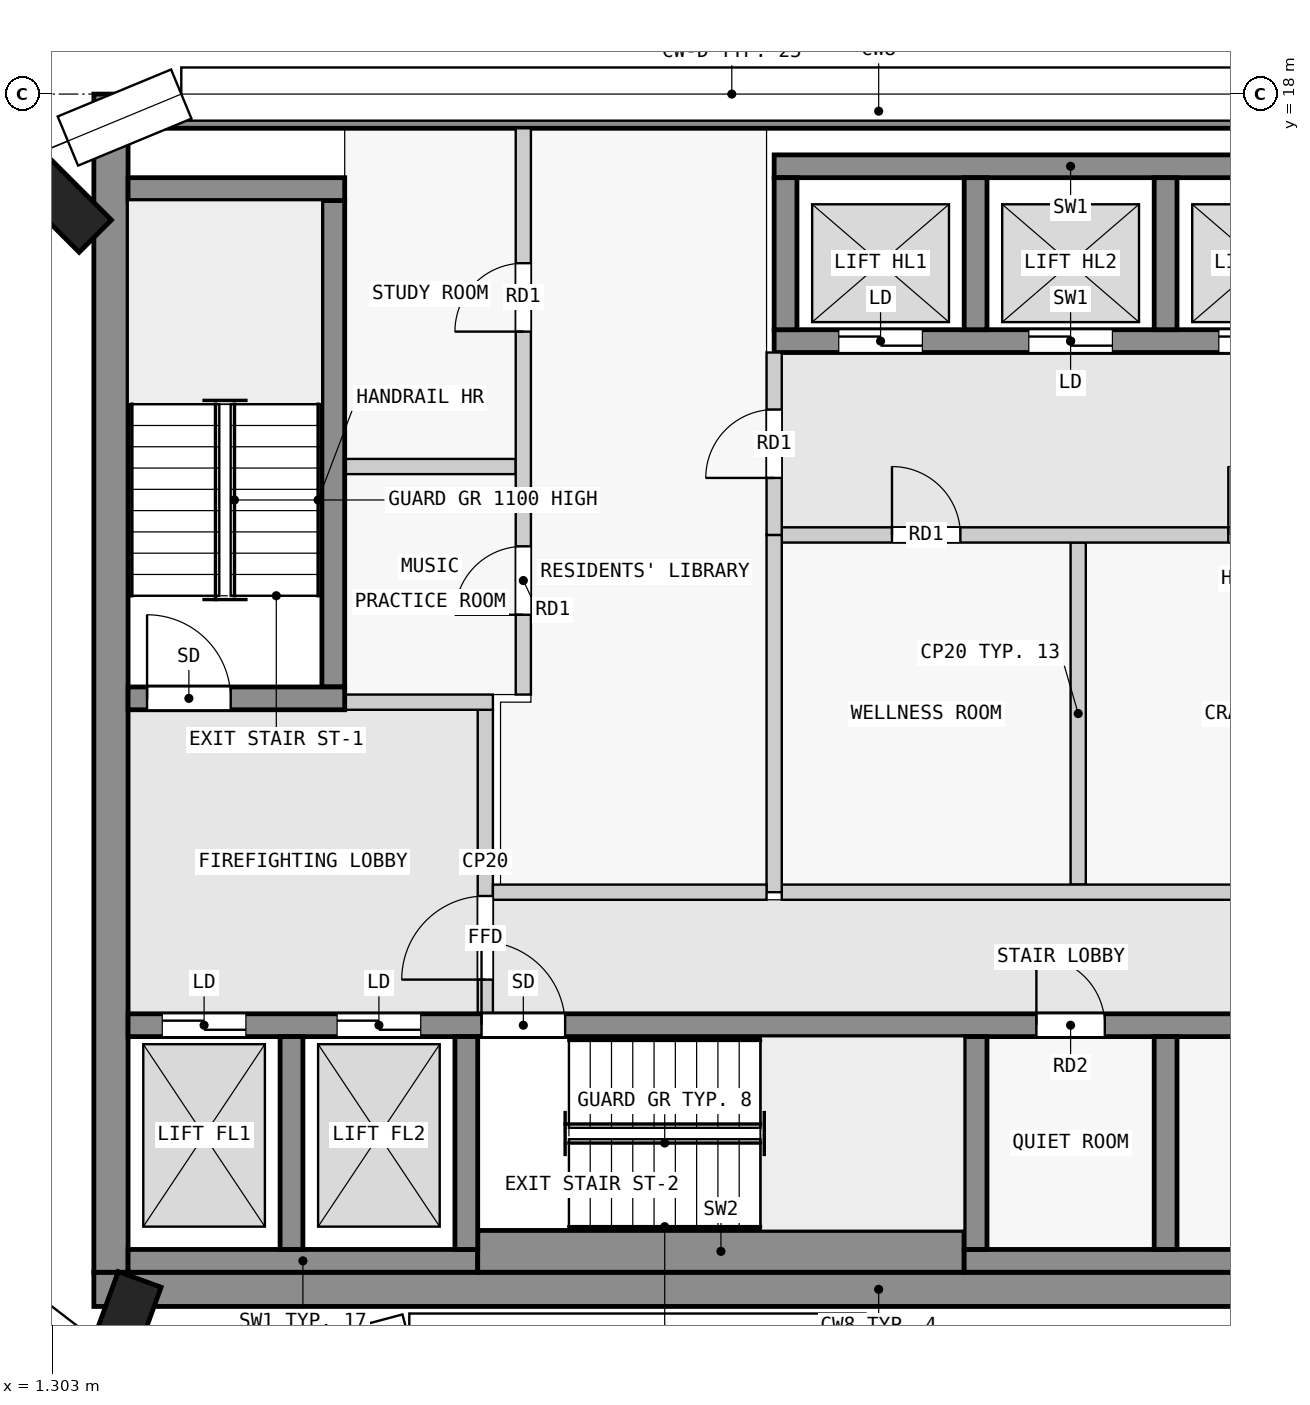
"""IFC4 building model, lengths in metres.
Left out: names, types, materials, properties, quantities, classifications, styles, units other than length and angle.
Written with IfcOpenShell. Run it as: python <this file> out.ifc"""

import sys

from ifc_helpers import new_model, si_unit, direction, frame, frame_2d, origin, origin_2d, place, context, subcontext, project, spatial, rectangle, extrude, element, fill, save


model = new_model("IFC4")
c1 = context("Model", 3, precision=1e-05, world=origin(), true_north=direction((0.0, 1.0)))
c2 = subcontext(c1, "Body", "Model", "MODEL_VIEW")
j1 = project(units=[si_unit("LENGTHUNIT", "METRE"), si_unit("PLANEANGLEUNIT", "RADIAN")], contexts=[c1])
p1 = place(None, origin())
s1 = spatial("IfcSite", under=j1, at=p1, CompositionType="ELEMENT")
p2 = place(p1, origin())
s2 = spatial("IfcBuilding", under=s1, at=p2, CompositionType="ELEMENT")
p3 = place(p2, frame((0.0, 0.0, 291.4)))
s3 = spatial("IfcBuildingStorey", under=s2, at=p3, CompositionType="ELEMENT", Elevation=291.4)
for number, where, z_axis, x_axis in (
    (1, (1.374, 16.626, 0.0), (0.0, 0.0, 1.0), (0.707, 0.707, 0.0)),
    (2, (2.213, 1.748, 0.0), (0.0, 0.0, 1.0), (-0.94, 0.342, 0.0)),
):
    element("IfcColumn", number, at=place(p3, frame(where, z_axis=z_axis, x_axis=x_axis)), inside=s3, PredefinedType="COLUMN", context=c2, shape_type="SweptSolid", body=[
        extrude(rectangle(XDim=0.6, YDim=1.4, at=origin_2d()), origin(), (0.0, 0.0, 1.0), 3.5),
    ])
for number, where, z_axis, x_axis in (
    (3, (1.85, 2.275, 0.0), (0.0, 0.0, 1.0), (1.0, 0.0, 0.0)),
    (4, (1.85, 17.775, 0.0), (0.0, 0.0, 1.0), (1.0, 0.0, 0.0)),
):
    element("IfcWall", number, at=place(p3, frame(where, z_axis=z_axis, x_axis=x_axis)), inside=s3, PredefinedType="SHEAR", context=c2, shape_type="SweptSolid", body=[
        extrude(rectangle(XDim=20.65, YDim=0.45, at=frame_2d((10.325, 0.0))), origin(), (0.0, 0.0, 1.0), 3.05),
    ])
p4 = place(p3, frame((2.075, 2.5, 0.0), z_axis=(0.0, 0.0, 1.0), x_axis=(0.0, 1.0, 0.0)))
e5 = element("IfcWall", 5, at=p4, inside=s3, PredefinedType="SHEAR", context=c2, shape_type="SweptSolid", body=[
    extrude(rectangle(XDim=15.05, YDim=0.45, at=frame_2d((7.525, 0.0))), origin(), (0.0, 0.0, 1.0), 3.05),
])
p5 = place(p3, frame((2.3, 2.65, 0.0), z_axis=(0.0, 0.0, 1.0), x_axis=(1.0, 0.0, 0.0)))
e6 = element("IfcWall", 6, at=p5, inside=s3, PredefinedType="SHEAR", context=c2, shape_type="SweptSolid", body=[
    extrude(rectangle(XDim=4.6, YDim=0.3, at=frame_2d((2.3, 0.0))), origin(), (0.0, 0.0, 1.0), 3.05),
])
p6 = place(p3, frame((6.9, 2.775, 0.0), z_axis=(0.0, 0.0, 1.0), x_axis=(1.0, 0.0, 0.0)))
e7 = element("IfcWall", 7, at=p6, inside=s3, PredefinedType="SHEAR", context=c2, shape_type="SweptSolid", body=[
    extrude(rectangle(XDim=6.4, YDim=0.55, at=frame_2d((3.2, 0.0))), origin(), (0.0, 0.0, 1.0), 3.05),
])
p7 = place(p3, frame((13.3, 2.65, 0.0), z_axis=(0.0, 0.0, 1.0), x_axis=(1.0, 0.0, 0.0)))
e8 = element("IfcWall", 8, at=p7, inside=s3, PredefinedType="SHEAR", context=c2, shape_type="SweptSolid", body=[
    extrude(rectangle(XDim=7.8, YDim=0.3, at=frame_2d((3.9, 0.0))), origin(), (0.0, 0.0, 1.0), 3.05),
])
for number, where, z_axis, x_axis in (
    (9, (4.45, 2.8, 0.0), (0.0, 0.0, 1.0), (0.0, 1.0, 0.0)),
    (10, (6.75, 2.8, 0.0), (0.0, 0.0, 1.0), (0.0, 1.0, 0.0)),
    (11, (13.45, 2.8, 0.0), (0.0, 0.0, 1.0), (0.0, 1.0, 0.0)),
    (12, (15.95, 2.8, 0.0), (0.0, 0.0, 1.0), (0.0, 1.0, 0.0)),
):
    element("IfcWall", number, at=place(p3, frame(where, z_axis=z_axis, x_axis=x_axis)), inside=s3, PredefinedType="SHEAR", context=c2, shape_type="SweptSolid", body=[
        extrude(rectangle(XDim=2.8, YDim=0.3, at=frame_2d((1.4, 0.0))), origin(), (0.0, 0.0, 1.0), 3.05),
    ])
p8 = place(p3, frame((2.3, 5.75, 0.0), z_axis=(0.0, 0.0, 1.0), x_axis=(1.0, 0.0, 0.0)))
e13 = element("IfcWall", 13, at=p8, inside=s3, PredefinedType="SHEAR", context=c2, shape_type="SweptSolid", body=[
    extrude(rectangle(XDim=18.8, YDim=0.3, at=frame_2d((9.4, 0.0))), origin(), (0.0, 0.0, 1.0), 3.05),
])
p9 = place(p8, frame((4.65, 0.0, 0.0)))
e14 = element("IfcOpeningElement", 14, at=p9, cuts=e13, PredefinedType="OPENING", context=c2, shape_type="SweptSolid", body=[
    extrude(rectangle(XDim=1.1, YDim=2.1, at=frame_2d((0.55, 1.05))), frame((0.0, 0.16, 0.0), z_axis=(0.0, -1.0, 0.0), x_axis=(1.0, 0.0, 0.0)), (0.0, 0.0, 1.0), 0.32),
])
p10 = place(p8, frame((0.45, 0.0, 0.0)))
e15 = element("IfcOpeningElement", 15, at=p10, cuts=e13, PredefinedType="OPENING", context=c2, shape_type="SweptSolid", body=[
    extrude(rectangle(XDim=1.1, YDim=2.1, at=frame_2d((0.55, 1.05))), frame((0.0, 0.16, 0.0), z_axis=(0.0, -1.0, 0.0), x_axis=(1.0, 0.0, 0.0)), (0.0, 0.0, 1.0), 0.32),
])
p11 = place(p8, frame((2.75, 0.0, 0.0)))
e16 = element("IfcOpeningElement", 16, at=p11, cuts=e13, PredefinedType="OPENING", context=c2, shape_type="SweptSolid", body=[
    extrude(rectangle(XDim=1.1, YDim=2.1, at=frame_2d((0.55, 1.05))), frame((0.0, 0.16, 0.0), z_axis=(0.0, -1.0, 0.0), x_axis=(1.0, 0.0, 0.0)), (0.0, 0.0, 1.0), 0.32),
])
p12 = place(p8, frame((11.95, 0.0, 0.0)))
e17 = element("IfcOpeningElement", 17, at=p12, cuts=e13, PredefinedType="OPENING", context=c2, shape_type="SweptSolid", body=[
    extrude(rectangle(XDim=0.9, YDim=2.1, at=frame_2d((0.45, 1.05))), frame((0.0, 0.16, 0.0), z_axis=(0.0, -1.0, 0.0), x_axis=(1.0, 0.0, 0.0)), (0.0, 0.0, 1.0), 0.32),
])
p13 = place(p8, frame((15.7, 0.0, 0.0)))
e18 = element("IfcOpeningElement", 18, at=p13, cuts=e13, PredefinedType="OPENING", context=c2, shape_type="SweptSolid", body=[
    extrude(rectangle(XDim=0.9, YDim=2.1, at=frame_2d((0.45, 1.05))), frame((0.0, 0.16, 0.0), z_axis=(0.0, -1.0, 0.0), x_axis=(1.0, 0.0, 0.0)), (0.0, 0.0, 1.0), 0.32),
])
p14 = place(p3, frame((2.3, 10.05, 0.0), z_axis=(0.0, 0.0, 1.0), x_axis=(1.0, 0.0, 0.0)))
e19 = element("IfcWall", 19, at=p14, inside=s3, PredefinedType="SHEAR", context=c2, shape_type="SweptSolid", body=[
    extrude(rectangle(XDim=2.85, YDim=0.3, at=frame_2d((1.425, 0.0))), origin(), (0.0, 0.0, 1.0), 3.05),
])
p15 = place(p14, frame((0.25, 0.0, 0.0)))
e20 = element("IfcOpeningElement", 20, at=p15, cuts=e19, PredefinedType="OPENING", context=c2, shape_type="SweptSolid", body=[
    extrude(rectangle(XDim=1.1, YDim=2.1, at=frame_2d((0.55, 1.05))), frame((0.0, 0.16, 0.0), z_axis=(0.0, -1.0, 0.0), x_axis=(1.0, 0.0, 0.0)), (0.0, 0.0, 1.0), 0.32),
])
p16 = place(p3, frame((5.0, 10.2, 0.0), z_axis=(0.0, 0.0, 1.0), x_axis=(0.0, 1.0, 0.0)))
e21 = element("IfcWall", 21, at=p16, inside=s3, PredefinedType="SHEAR", context=c2, shape_type="SweptSolid", body=[
    extrude(rectangle(XDim=6.4, YDim=0.3, at=frame_2d((3.2, 0.0))), origin(), (0.0, 0.0, 1.0), 3.05),
])
p17 = place(p3, frame((2.3, 16.75, 0.0), z_axis=(0.0, 0.0, 1.0), x_axis=(1.0, 0.0, 0.0)))
e22 = element("IfcWall", 22, at=p17, inside=s3, PredefinedType="SHEAR", context=c2, shape_type="SweptSolid", body=[
    extrude(rectangle(XDim=2.85, YDim=0.3, at=frame_2d((1.425, 0.0))), origin(), (0.0, 0.0, 1.0), 3.05),
])
p18 = place(p3, frame((10.8, 17.05, 0.0), z_axis=(0.0, 0.0, 1.0), x_axis=(1.0, 0.0, 0.0)))
e23 = element("IfcWall", 23, at=p18, inside=s3, PredefinedType="SHEAR", context=c2, shape_type="SweptSolid", body=[
    extrude(rectangle(XDim=7.8, YDim=0.3, at=frame_2d((3.9, 0.0))), origin(), (0.0, 0.0, 1.0), 3.05),
])
p19 = place(p3, frame((10.8, 14.75, 0.0), z_axis=(0.0, 0.0, 1.0), x_axis=(1.0, 0.0, 0.0)))
e24 = element("IfcWall", 24, at=p19, inside=s3, PredefinedType="SHEAR", context=c2, shape_type="SweptSolid", body=[
    extrude(rectangle(XDim=7.8, YDim=0.3, at=frame_2d((3.9, 0.0))), origin(), (0.0, 0.0, 1.0), 3.05),
])
p20 = place(p19, frame((0.85, 0.0, 0.0)))
e25 = element("IfcOpeningElement", 25, at=p20, cuts=e24, PredefinedType="OPENING", context=c2, shape_type="SweptSolid", body=[
    extrude(rectangle(XDim=1.1, YDim=2.1, at=frame_2d((0.55, 1.05))), frame((0.0, 0.16, 0.0), z_axis=(0.0, -1.0, 0.0), x_axis=(1.0, 0.0, 0.0)), (0.0, 0.0, 1.0), 0.32),
])
p21 = place(p19, frame((3.35, 0.0, 0.0)))
e26 = element("IfcOpeningElement", 26, at=p21, cuts=e24, PredefinedType="OPENING", context=c2, shape_type="SweptSolid", body=[
    extrude(rectangle(XDim=1.1, YDim=2.1, at=frame_2d((0.55, 1.05))), frame((0.0, 0.16, 0.0), z_axis=(0.0, -1.0, 0.0), x_axis=(1.0, 0.0, 0.0)), (0.0, 0.0, 1.0), 0.32),
])
p22 = place(p19, frame((5.85, 0.0, 0.0)))
e27 = element("IfcOpeningElement", 27, at=p22, cuts=e24, PredefinedType="OPENING", context=c2, shape_type="SweptSolid", body=[
    extrude(rectangle(XDim=1.1, YDim=2.1, at=frame_2d((0.55, 1.05))), frame((0.0, 0.16, 0.0), z_axis=(0.0, -1.0, 0.0), x_axis=(1.0, 0.0, 0.0)), (0.0, 0.0, 1.0), 0.32),
])
for number, where, z_axis, x_axis in (
    (28, (10.95, 14.9, 0.0), (0.0, 0.0, 1.0), (0.0, 1.0, 0.0)),
    (29, (13.45, 14.9, 0.0), (0.0, 0.0, 1.0), (0.0, 1.0, 0.0)),
    (30, (15.95, 14.9, 0.0), (0.0, 0.0, 1.0), (0.0, 1.0, 0.0)),
):
    element("IfcWall", number, at=place(p3, frame(where, z_axis=z_axis, x_axis=x_axis)), inside=s3, PredefinedType="SHEAR", context=c2, shape_type="SweptSolid", body=[
        extrude(rectangle(XDim=2.0, YDim=0.3, at=frame_2d((1.0, 0.0))), origin(), (0.0, 0.0, 1.0), 3.05),
    ])
p23 = place(p3, frame((7.0, 5.9, 0.0), z_axis=(0.0, 0.0, 1.0), x_axis=(0.0, 1.0, 0.0)))
e31 = element("IfcWall", 31, at=p23, inside=s3, PredefinedType="PARTITIONING", context=c2, shape_type="SweptSolid", body=[
    extrude(rectangle(XDim=4.0, YDim=0.2, at=frame_2d((2.0, 0.0))), origin(), (0.0, 0.0, 1.0), 3.05),
])
p24 = place(p23, frame((0.45, 0.0, 0.0)))
e32 = element("IfcOpeningElement", 32, at=p24, cuts=e31, PredefinedType="OPENING", context=c2, shape_type="SweptSolid", body=[
    extrude(rectangle(XDim=1.1, YDim=2.1, at=frame_2d((0.55, 1.05))), frame((0.0, 0.11, 0.0), z_axis=(0.0, -1.0, 0.0), x_axis=(1.0, 0.0, 0.0)), (0.0, 0.0, 1.0), 0.22),
])
p25 = place(p3, frame((5.15, 10.0, 0.0), z_axis=(0.0, 0.0, 1.0), x_axis=(1.0, 0.0, 0.0)))
e33 = element("IfcWall", 33, at=p25, inside=s3, PredefinedType="PARTITIONING", context=c2, shape_type="SweptSolid", body=[
    extrude(rectangle(XDim=1.95, YDim=0.2, at=frame_2d((0.975, 0.0))), origin(), (0.0, 0.0, 1.0), 3.05),
])
p26 = place(p3, frame((7.1, 7.5, 0.0), z_axis=(0.0, 0.0, 1.0), x_axis=(1.0, 0.0, 0.0)))
e34 = element("IfcWall", 34, at=p26, inside=s3, PredefinedType="PARTITIONING", context=c2, shape_type="SweptSolid", body=[
    extrude(rectangle(XDim=3.6, YDim=0.2, at=frame_2d((1.8, 0.0))), origin(), (0.0, 0.0, 1.0), 3.05),
])
p27 = place(p3, frame((10.8, 12.2, 0.0), z_axis=(0.0, 0.0, 1.0), x_axis=(0.0, 1.0, 0.0)))
e35 = element("IfcWall", 35, at=p27, inside=s3, PredefinedType="PARTITIONING", context=c2, shape_type="SweptSolid", body=[
    extrude(rectangle(XDim=2.4, YDim=0.2, at=frame_2d((1.2, 0.0))), origin(), (0.0, 0.0, 1.0), 3.05),
])
p28 = place(p27, frame((0.75, 0.0, 0.0)))
e36 = element("IfcOpeningElement", 36, at=p28, cuts=e35, PredefinedType="OPENING", context=c2, shape_type="SweptSolid", body=[
    extrude(rectangle(XDim=0.9, YDim=2.1, at=frame_2d((0.45, 1.05))), frame((0.0, 0.11, 0.0), z_axis=(0.0, -1.0, 0.0), x_axis=(1.0, 0.0, 0.0)), (0.0, 0.0, 1.0), 0.22),
])
p29 = place(p3, frame((10.8, 7.5, 0.0), z_axis=(0.0, 0.0, 1.0), x_axis=(0.0, 1.0, 0.0)))
e37 = element("IfcWall", 37, at=p29, inside=s3, PredefinedType="PARTITIONING", context=c2, shape_type="SweptSolid", body=[
    extrude(rectangle(XDim=4.7, YDim=0.2, at=frame_2d((2.35, 0.0))), origin(), (0.0, 0.0, 1.0), 3.05),
])
p30 = place(p3, frame((10.9, 7.5, 0.0), z_axis=(0.0, 0.0, 1.0), x_axis=(1.0, 0.0, 0.0)))
e38 = element("IfcWall", 38, at=p30, inside=s3, PredefinedType="PARTITIONING", context=c2, shape_type="SweptSolid", body=[
    extrude(rectangle(XDim=8.65, YDim=0.2, at=frame_2d((4.325, 0.0))), origin(), (0.0, 0.0, 1.0), 3.05),
])
p31 = place(p3, frame((10.9, 12.2, 0.0), z_axis=(0.0, 0.0, 1.0), x_axis=(1.0, 0.0, 0.0)))
e39 = element("IfcWall", 39, at=p31, inside=s3, PredefinedType="PARTITIONING", context=c2, shape_type="SweptSolid", body=[
    extrude(rectangle(XDim=8.65, YDim=0.2, at=frame_2d((4.325, 0.0))), origin(), (0.0, 0.0, 1.0), 3.05),
])
p32 = place(p31, frame((1.45, 0.0, 0.0)))
e40 = element("IfcOpeningElement", 40, at=p32, cuts=e39, PredefinedType="OPENING", context=c2, shape_type="SweptSolid", body=[
    extrude(rectangle(XDim=0.9, YDim=2.1, at=frame_2d((0.45, 1.05))), frame((0.0, 0.11, 0.0), z_axis=(0.0, -1.0, 0.0), x_axis=(1.0, 0.0, 0.0)), (0.0, 0.0, 1.0), 0.22),
])
p33 = place(p31, frame((5.875, 0.0, 0.0)))
e41 = element("IfcOpeningElement", 41, at=p33, cuts=e39, PredefinedType="OPENING", context=c2, shape_type="SweptSolid", body=[
    extrude(rectangle(XDim=0.9, YDim=2.1, at=frame_2d((0.45, 1.05))), frame((0.0, 0.11, 0.0), z_axis=(0.0, -1.0, 0.0), x_axis=(1.0, 0.0, 0.0)), (0.0, 0.0, 1.0), 0.22),
])
p34 = place(p3, frame((14.8, 7.6, 0.0), z_axis=(0.0, 0.0, 1.0), x_axis=(0.0, 1.0, 0.0)))
e42 = element("IfcWall", 42, at=p34, inside=s3, PredefinedType="PARTITIONING", context=c2, shape_type="SweptSolid", body=[
    extrude(rectangle(XDim=4.5, YDim=0.2, at=frame_2d((2.25, 0.0))), origin(), (0.0, 0.0, 1.0), 3.05),
])
p35 = place(p3, frame((7.5, 10.1, 0.0), z_axis=(0.0, 0.0, 1.0), x_axis=(0.0, 1.0, 0.0)))
e43 = element("IfcWall", 43, at=p35, inside=s3, PredefinedType="PARTITIONING", context=c2, shape_type="SweptSolid", body=[
    extrude(rectangle(XDim=7.45, YDim=0.2, at=frame_2d((3.725, 0.0))), origin(), (0.0, 0.0, 1.0), 3.05),
])
p36 = place(p35, frame((1.05, 0.0, 0.0)))
e44 = element("IfcOpeningElement", 44, at=p36, cuts=e43, PredefinedType="OPENING", context=c2, shape_type="SweptSolid", body=[
    extrude(rectangle(XDim=0.9, YDim=2.1, at=frame_2d((0.45, 1.05))), frame((0.0, 0.11, 0.0), z_axis=(0.0, -1.0, 0.0), x_axis=(1.0, 0.0, 0.0)), (0.0, 0.0, 1.0), 0.22),
])
p37 = place(p35, frame((4.775, 0.0, 0.0)))
e45 = element("IfcOpeningElement", 45, at=p37, cuts=e43, PredefinedType="OPENING", context=c2, shape_type="SweptSolid", body=[
    extrude(rectangle(XDim=0.9, YDim=2.1, at=frame_2d((0.45, 1.05))), frame((0.0, 0.11, 0.0), z_axis=(0.0, -1.0, 0.0), x_axis=(1.0, 0.0, 0.0)), (0.0, 0.0, 1.0), 0.22),
])
p38 = place(p3, frame((5.15, 13.1, 0.0), z_axis=(0.0, 0.0, 1.0), x_axis=(1.0, 0.0, 0.0)))
e46 = element("IfcWall", 46, at=p38, inside=s3, PredefinedType="PARTITIONING", context=c2, shape_type="SweptSolid", body=[
    extrude(rectangle(XDim=2.25, YDim=0.2, at=frame_2d((1.125, 0.0))), origin(), (0.0, 0.0, 1.0), 3.05),
])
p39 = place(p24, origin())
e47 = element("IfcDoor", 47, at=p39, inside=s3, OperationType="SINGLE_SWING_LEFT", PredefinedType="DOOR", context=c2, shape_type="SweptSolid", body=[
    extrude(rectangle(XDim=1.1, YDim=2.1, at=frame_2d((0.55, 1.05))), frame((0.0, 0.025, 0.0), z_axis=(0.0, -1.0, 0.0), x_axis=(1.0, 0.0, 0.0)), (0.0, 0.0, 1.0), 0.05),
])
fill(e32, e47)
p40 = place(p15, origin())
e48 = element("IfcDoor", 48, at=p40, inside=s3, OperationType="SINGLE_SWING_RIGHT", PredefinedType="DOOR", context=c2, shape_type="SweptSolid", body=[
    extrude(rectangle(XDim=1.1, YDim=2.1, at=frame_2d((0.55, 1.05))), frame((0.0, 0.025, 0.0), z_axis=(0.0, -1.0, 0.0), x_axis=(1.0, 0.0, 0.0)), (0.0, 0.0, 1.0), 0.05),
])
fill(e20, e48)
p41 = place(p28, origin())
e49 = element("IfcDoor", 49, at=p41, inside=s3, OperationType="SINGLE_SWING_LEFT", PredefinedType="DOOR", context=c2, shape_type="SweptSolid", body=[
    extrude(rectangle(XDim=0.9, YDim=2.1, at=frame_2d((0.45, 1.05))), frame((0.0, 0.025, 0.0), z_axis=(0.0, -1.0, 0.0), x_axis=(1.0, 0.0, 0.0)), (0.0, 0.0, 1.0), 0.05),
])
fill(e36, e49)
p42 = place(p32, origin())
e50 = element("IfcDoor", 50, at=p42, inside=s3, OperationType="SINGLE_SWING_LEFT", PredefinedType="DOOR", context=c2, shape_type="SweptSolid", body=[
    extrude(rectangle(XDim=0.9, YDim=2.1, at=frame_2d((0.45, 1.05))), frame((0.0, 0.025, 0.0), z_axis=(0.0, -1.0, 0.0), x_axis=(1.0, 0.0, 0.0)), (0.0, 0.0, 1.0), 0.05),
])
fill(e40, e50)
p43 = place(p33, origin())
e51 = element("IfcDoor", 51, at=p43, inside=s3, OperationType="SINGLE_SWING_LEFT", PredefinedType="DOOR", context=c2, shape_type="SweptSolid", body=[
    extrude(rectangle(XDim=0.9, YDim=2.1, at=frame_2d((0.45, 1.05))), frame((0.0, 0.025, 0.0), z_axis=(0.0, -1.0, 0.0), x_axis=(1.0, 0.0, 0.0)), (0.0, 0.0, 1.0), 0.05),
])
fill(e41, e51)
p44 = place(p9, origin())
e52 = element("IfcDoor", 52, at=p44, inside=s3, OperationType="SINGLE_SWING_LEFT", PredefinedType="DOOR", context=c2, shape_type="SweptSolid", body=[
    extrude(rectangle(XDim=1.1, YDim=2.1, at=frame_2d((0.55, 1.05))), frame((0.0, 0.025, 0.0), z_axis=(0.0, -1.0, 0.0), x_axis=(1.0, 0.0, 0.0)), (0.0, 0.0, 1.0), 0.05),
])
fill(e14, e52)
p45 = place(p10, origin())
e53 = element("IfcDoor", 53, at=p45, inside=s3, OperationType="DOUBLE_DOOR_SLIDING", PredefinedType="DOOR", context=c2, shape_type="SweptSolid", body=[
    extrude(rectangle(XDim=1.1, YDim=2.1, at=frame_2d((0.55, 1.05))), frame((0.0, 0.025, 0.0), z_axis=(0.0, -1.0, 0.0), x_axis=(1.0, 0.0, 0.0)), (0.0, 0.0, 1.0), 0.05),
])
fill(e15, e53)
p46 = place(p11, origin())
e54 = element("IfcDoor", 54, at=p46, inside=s3, OperationType="DOUBLE_DOOR_SLIDING", PredefinedType="DOOR", context=c2, shape_type="SweptSolid", body=[
    extrude(rectangle(XDim=1.1, YDim=2.1, at=frame_2d((0.55, 1.05))), frame((0.0, 0.025, 0.0), z_axis=(0.0, -1.0, 0.0), x_axis=(1.0, 0.0, 0.0)), (0.0, 0.0, 1.0), 0.05),
])
fill(e16, e54)
p47 = place(p20, origin())
e55 = element("IfcDoor", 55, at=p47, inside=s3, OperationType="DOUBLE_DOOR_SLIDING", PredefinedType="DOOR", context=c2, shape_type="SweptSolid", body=[
    extrude(rectangle(XDim=1.1, YDim=2.1, at=frame_2d((0.55, 1.05))), frame((0.0, 0.025, 0.0), z_axis=(0.0, -1.0, 0.0), x_axis=(1.0, 0.0, 0.0)), (0.0, 0.0, 1.0), 0.05),
])
fill(e25, e55)
p48 = place(p21, origin())
e56 = element("IfcDoor", 56, at=p48, inside=s3, OperationType="DOUBLE_DOOR_SLIDING", PredefinedType="DOOR", context=c2, shape_type="SweptSolid", body=[
    extrude(rectangle(XDim=1.1, YDim=2.1, at=frame_2d((0.55, 1.05))), frame((0.0, 0.025, 0.0), z_axis=(0.0, -1.0, 0.0), x_axis=(1.0, 0.0, 0.0)), (0.0, 0.0, 1.0), 0.05),
])
fill(e26, e56)
p49 = place(p22, origin())
e57 = element("IfcDoor", 57, at=p49, inside=s3, OperationType="DOUBLE_DOOR_SLIDING", PredefinedType="DOOR", context=c2, shape_type="SweptSolid", body=[
    extrude(rectangle(XDim=1.1, YDim=2.1, at=frame_2d((0.55, 1.05))), frame((0.0, 0.025, 0.0), z_axis=(0.0, -1.0, 0.0), x_axis=(1.0, 0.0, 0.0)), (0.0, 0.0, 1.0), 0.05),
])
fill(e27, e57)
p50 = place(p36, origin())
e58 = element("IfcDoor", 58, at=p50, inside=s3, OperationType="SINGLE_SWING_RIGHT", PredefinedType="DOOR", context=c2, shape_type="SweptSolid", body=[
    extrude(rectangle(XDim=0.9, YDim=2.1, at=frame_2d((0.45, 1.05))), frame((0.0, 0.025, 0.0), z_axis=(0.0, -1.0, 0.0), x_axis=(1.0, 0.0, 0.0)), (0.0, 0.0, 1.0), 0.05),
])
fill(e44, e58)
p51 = place(p37, origin())
e59 = element("IfcDoor", 59, at=p51, inside=s3, OperationType="SINGLE_SWING_RIGHT", PredefinedType="DOOR", context=c2, shape_type="SweptSolid", body=[
    extrude(rectangle(XDim=0.9, YDim=2.1, at=frame_2d((0.45, 1.05))), frame((0.0, 0.025, 0.0), z_axis=(0.0, -1.0, 0.0), x_axis=(1.0, 0.0, 0.0)), (0.0, 0.0, 1.0), 0.05),
])
fill(e45, e59)
p52 = place(p12, origin())
e60 = element("IfcDoor", 60, at=p52, inside=s3, OperationType="SINGLE_SWING_LEFT", PredefinedType="DOOR", context=c2, shape_type="SweptSolid", body=[
    extrude(rectangle(XDim=0.9, YDim=2.1, at=frame_2d((0.45, 1.05))), frame((0.0, 0.025, 0.0), z_axis=(0.0, -1.0, 0.0), x_axis=(1.0, 0.0, 0.0)), (0.0, 0.0, 1.0), 0.05),
])
fill(e17, e60)
save(model, sys.argv[1])
